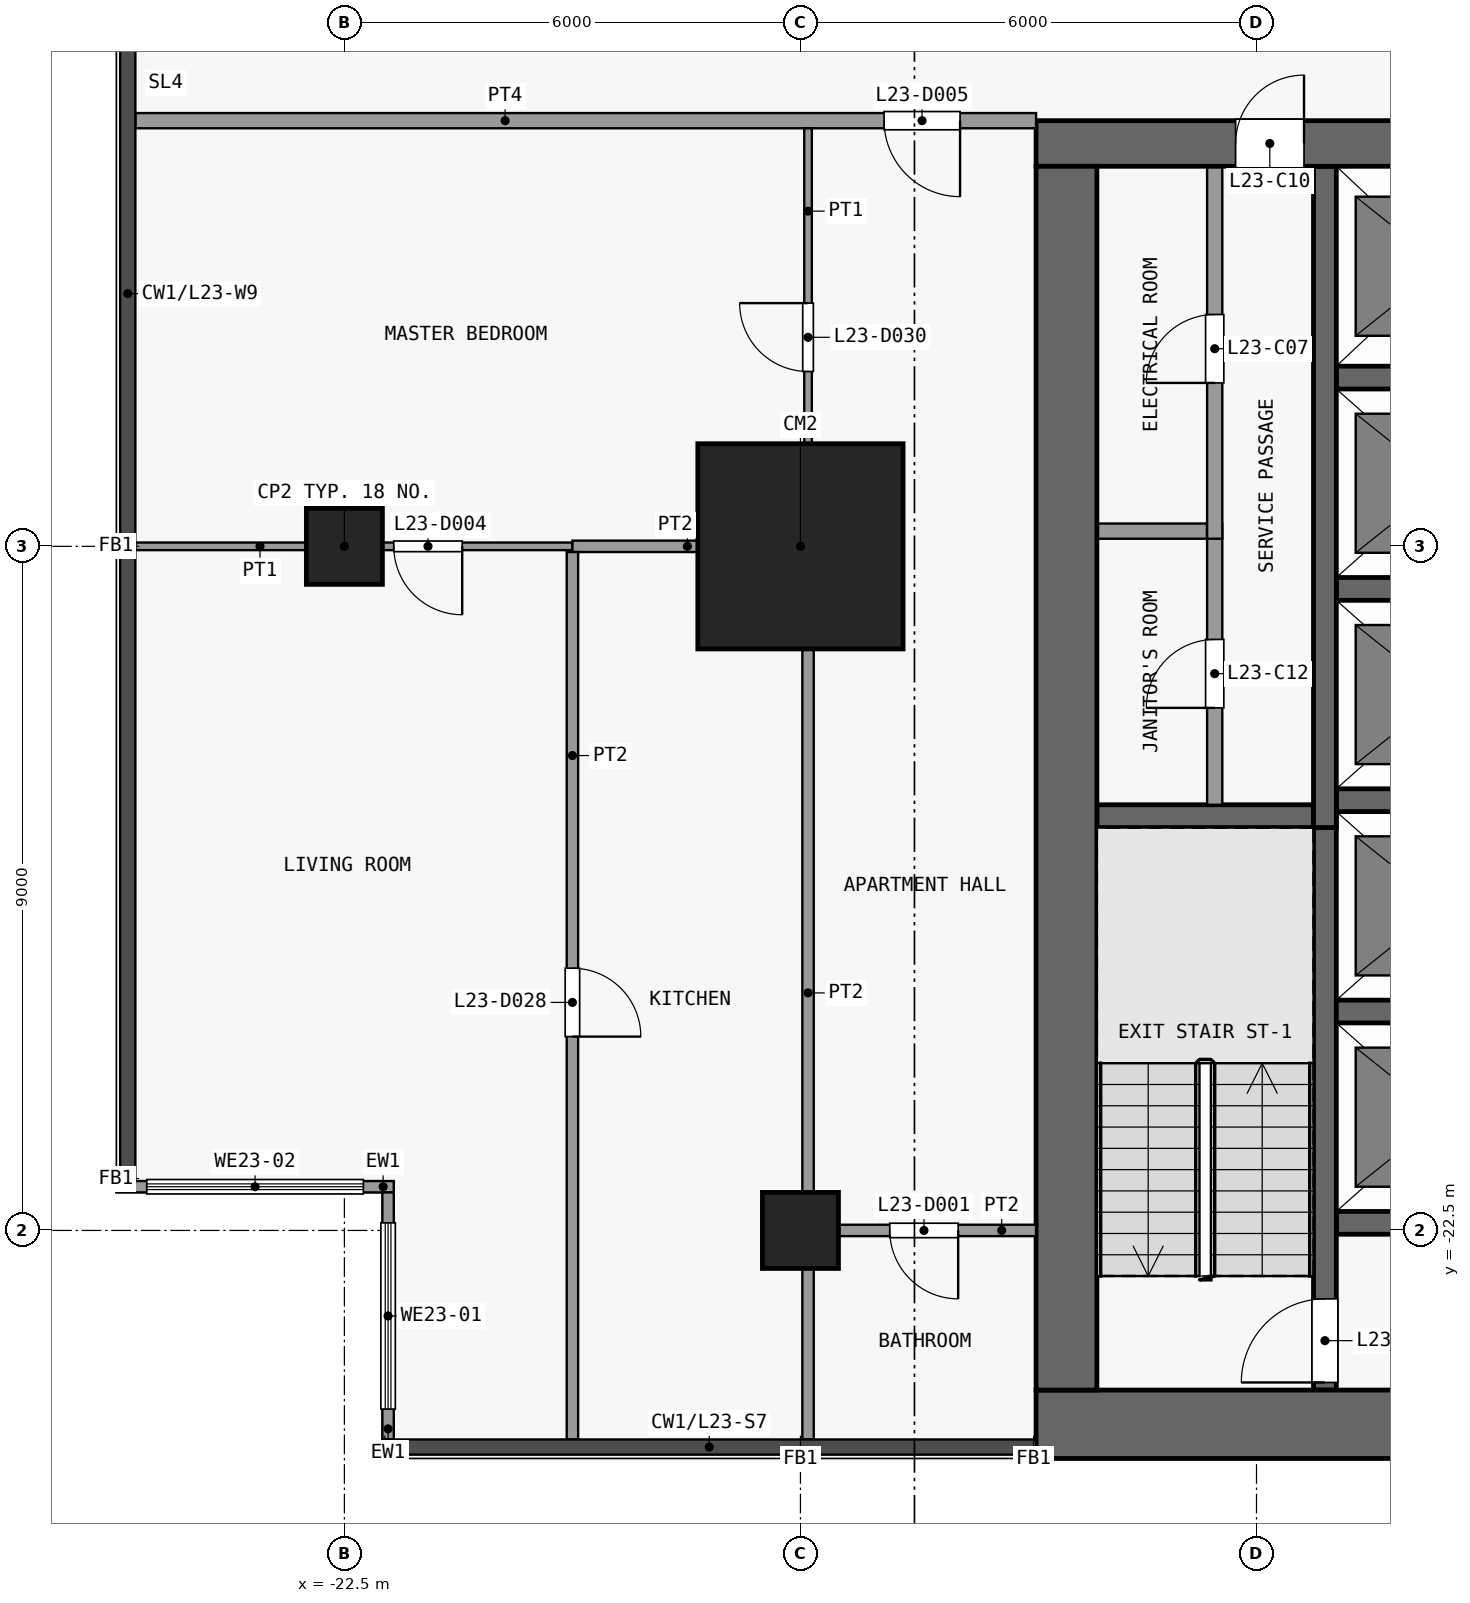
"""IFC4 building model, lengths in metres.
Left out: names, types, materials, properties, quantities, classifications, styles, units other than length and angle.
Written with IfcOpenShell. Run it as: python <this file> out.ifc"""

import sys

from ifc_helpers import new_model, si_unit, direction, frame, frame_2d, origin, origin_2d, place, context, subcontext, project, spatial, rectangle, extrude, element, fill, save


model = new_model("IFC4")
c1 = context("Model", 3, precision=1e-05, world=origin(), true_north=direction((0.0, 1.0)))
c2 = subcontext(c1, "Body", "Model", "MODEL_VIEW")
j1 = project(units=[si_unit("LENGTHUNIT", "METRE"), si_unit("PLANEANGLEUNIT", "RADIAN")], contexts=[c1])
p1 = place(None, origin())
s1 = spatial("IfcSite", under=j1, at=p1, CompositionType="ELEMENT")
p2 = place(p1, origin())
s2 = spatial("IfcBuilding", under=s1, at=p2, CompositionType="ELEMENT")
p3 = place(p2, frame((0.0, 0.0, 95.5)))
s3 = spatial("IfcBuildingStorey", under=s2, at=p3, CompositionType="ELEMENT", Elevation=95.5)
for number, where, z_axis, x_axis in (
    (1, (-22.5, -13.5, 0.0), (0.0, 0.0, 1.0), (1.0, 0.0, 0.0)),
    (2, (-16.5, -22.5, 0.0), (0.0, 0.0, 1.0), (1.0, 0.0, 0.0)),
):
    element("IfcColumn", number, at=place(p3, frame(where, z_axis=z_axis, x_axis=x_axis)), inside=s3, PredefinedType="COLUMN", context=c2, shape_type="SweptSolid", body=[
        extrude(rectangle(XDim=1.0, YDim=1.0, at=origin_2d()), origin(), (0.0, 0.0, 1.0), 3.6),
    ])
p4 = place(p3, frame((-16.5, -13.5, 0.0), z_axis=(0.0, 0.0, 1.0), x_axis=(1.0, 0.0, 0.0)))
e3 = element("IfcColumn", 3, at=p4, inside=s3, PredefinedType="COLUMN", context=c2, shape_type="SweptSolid", body=[
    extrude(rectangle(XDim=2.7, YDim=2.7, at=origin_2d()), origin(), (0.0, 0.0, 1.0), 3.6),
])
p5 = place(p3, frame((-13.4, -25.05, 0.0), z_axis=(0.0, 0.0, 1.0), x_axis=(1.0, 0.0, 0.0)))
e4 = element("IfcWall", 4, at=p5, inside=s3, PredefinedType="SHEAR", context=c2, shape_type="SweptSolid", body=[
    extrude(rectangle(XDim=26.8, YDim=0.9, at=frame_2d((13.4, 0.0))), origin(), (0.0, 0.0, 1.0), 3.3),
])
p6 = place(p3, frame((-13.4, -8.2, 0.0), z_axis=(0.0, 0.0, 1.0), x_axis=(1.0, 0.0, 0.0)))
e5 = element("IfcWall", 5, at=p6, inside=s3, PredefinedType="SHEAR", context=c2, shape_type="SweptSolid", body=[
    extrude(rectangle(XDim=26.8, YDim=0.6, at=frame_2d((13.4, 0.0))), origin(), (0.0, 0.0, 1.0), 3.3),
])
p7 = place(p6, frame((7.7, 0.0, 0.0)))
e6 = element("IfcOpeningElement", 6, at=p7, cuts=e5, PredefinedType="OPENING", context=c2, shape_type="SweptSolid", body=[
    extrude(rectangle(XDim=1.8, YDim=2.1, at=frame_2d((0.9, 1.05))), frame((0.0, 0.31, 0.0), z_axis=(0.0, -1.0, 0.0), x_axis=(1.0, 0.0, 0.0)), (0.0, 0.0, 1.0), 0.62),
])
p8 = place(p6, frame((17.3, 0.0, 0.0)))
e7 = element("IfcOpeningElement", 7, at=p8, cuts=e5, PredefinedType="OPENING", context=c2, shape_type="SweptSolid", body=[
    extrude(rectangle(XDim=1.8, YDim=2.1, at=frame_2d((0.9, 1.05))), frame((0.0, 0.31, 0.0), z_axis=(0.0, -1.0, 0.0), x_axis=(1.0, 0.0, 0.0)), (0.0, 0.0, 1.0), 0.62),
])
p9 = place(p6, frame((2.625, 0.0, 0.0)))
e8 = element("IfcOpeningElement", 8, at=p9, cuts=e5, PredefinedType="OPENING", context=c2, shape_type="SweptSolid", body=[
    extrude(rectangle(XDim=0.9, YDim=2.1, at=frame_2d((0.45, 1.05))), frame((0.0, 0.31, 0.0), z_axis=(0.0, -1.0, 0.0), x_axis=(1.0, 0.0, 0.0)), (0.0, 0.0, 1.0), 0.62),
])
p10 = place(p6, frame((23.275, 0.0, 0.0)))
e9 = element("IfcOpeningElement", 9, at=p10, cuts=e5, PredefinedType="OPENING", context=c2, shape_type="SweptSolid", body=[
    extrude(rectangle(XDim=0.9, YDim=2.1, at=frame_2d((0.45, 1.05))), frame((0.0, 0.31, 0.0), z_axis=(0.0, -1.0, 0.0), x_axis=(1.0, 0.0, 0.0)), (0.0, 0.0, 1.0), 0.62),
])
p11 = place(p3, frame((-13.0, -24.6, 0.0), z_axis=(0.0, 0.0, 1.0), x_axis=(0.0, 1.0, 0.0)))
e10 = element("IfcWall", 10, at=p11, inside=s3, PredefinedType="SHEAR", context=c2, shape_type="SweptSolid", body=[
    extrude(rectangle(XDim=16.1, YDim=0.8, at=frame_2d((8.05, 0.0))), origin(), (0.0, 0.0, 1.0), 3.3),
])
for number, where, z_axis, x_axis in (
    (11, (-9.45, -22.4, 0.0), (0.0, 0.0, 1.0), (1.0, 0.0, 0.0)),
    (12, (-9.45, -19.62, 0.0), (0.0, 0.0, 1.0), (1.0, 0.0, 0.0)),
):
    element("IfcWall", number, at=place(p3, frame(where, z_axis=z_axis, x_axis=x_axis)), inside=s3, PredefinedType="SHEAR", context=c2, shape_type="SweptSolid", body=[
        extrude(rectangle(XDim=2.8, YDim=0.3, at=frame_2d((1.4, 0.0))), origin(), (0.0, 0.0, 1.0), 3.3),
    ])
p12 = place(p3, frame((-12.6, -17.05, 0.0), z_axis=(0.0, 0.0, 1.0), x_axis=(1.0, 0.0, 0.0)))
e13 = element("IfcWall", 13, at=p12, inside=s3, PredefinedType="SHEAR", context=c2, shape_type="SweptSolid", body=[
    extrude(rectangle(XDim=2.85, YDim=0.3, at=frame_2d((1.425, 0.0))), origin(), (0.0, 0.0, 1.0), 3.3),
])
for number, where, z_axis, x_axis in (
    (14, (-9.45, -16.84, 0.0), (0.0, 0.0, 1.0), (1.0, 0.0, 0.0)),
    (15, (-9.45, -14.06, 0.0), (0.0, 0.0, 1.0), (1.0, 0.0, 0.0)),
):
    element("IfcWall", number, at=place(p3, frame(where, z_axis=z_axis, x_axis=x_axis)), inside=s3, PredefinedType="SHEAR", context=c2, shape_type="SweptSolid", body=[
        extrude(rectangle(XDim=2.8, YDim=0.3, at=frame_2d((1.4, 0.0))), origin(), (0.0, 0.0, 1.0), 3.3),
    ])
p13 = place(p3, frame((-12.6, -13.3, 0.0), z_axis=(0.0, 0.0, 1.0), x_axis=(1.0, 0.0, 0.0)))
e16 = element("IfcWall", 16, at=p13, inside=s3, PredefinedType="PARTITIONING", context=c2, shape_type="SweptSolid", body=[
    extrude(rectangle(XDim=1.45, YDim=0.2, at=frame_2d((0.725, 0.0))), origin(), (0.0, 0.0, 1.0), 3.3),
])
p14 = place(p3, frame((-9.45, -11.28, 0.0), z_axis=(0.0, 0.0, 1.0), x_axis=(1.0, 0.0, 0.0)))
e17 = element("IfcWall", 17, at=p14, inside=s3, PredefinedType="SHEAR", context=c2, shape_type="SweptSolid", body=[
    extrude(rectangle(XDim=2.8, YDim=0.3, at=frame_2d((1.4, 0.0))), origin(), (0.0, 0.0, 1.0), 3.3),
])
p15 = place(p3, frame((-11.05, -16.9, 0.0), z_axis=(0.0, 0.0, 1.0), x_axis=(0.0, 1.0, 0.0)))
e18 = element("IfcWall", 18, at=p15, inside=s3, PredefinedType="PARTITIONING", context=c2, shape_type="SweptSolid", body=[
    extrude(rectangle(XDim=3.7, YDim=0.2, at=frame_2d((1.85, 0.0))), origin(), (0.0, 0.0, 1.0), 3.3),
])
p16 = place(p15, frame((1.275, 0.0, 0.0)))
e19 = element("IfcOpeningElement", 19, at=p16, cuts=e18, PredefinedType="OPENING", context=c2, shape_type="SweptSolid", body=[
    extrude(rectangle(XDim=0.9, YDim=2.1, at=frame_2d((0.45, 1.05))), frame((0.0, 0.11, 0.0), z_axis=(0.0, -1.0, 0.0), x_axis=(1.0, 0.0, 0.0)), (0.0, 0.0, 1.0), 0.22),
])
p17 = place(p3, frame((-11.05, -13.4, 0.0), z_axis=(0.0, 0.0, 1.0), x_axis=(0.0, 1.0, 0.0)))
e20 = element("IfcWall", 20, at=p17, inside=s3, PredefinedType="PARTITIONING", context=c2, shape_type="SweptSolid", body=[
    extrude(rectangle(XDim=4.9, YDim=0.2, at=frame_2d((2.45, 0.0))), origin(), (0.0, 0.0, 1.0), 3.3),
])
p18 = place(p17, frame((2.05, 0.0, 0.0)))
e21 = element("IfcOpeningElement", 21, at=p18, cuts=e20, PredefinedType="OPENING", context=c2, shape_type="SweptSolid", body=[
    extrude(rectangle(XDim=0.9, YDim=2.1, at=frame_2d((0.45, 1.05))), frame((0.0, 0.11, 0.0), z_axis=(0.0, -1.0, 0.0), x_axis=(1.0, 0.0, 0.0)), (0.0, 0.0, 1.0), 0.22),
])
p19 = place(p3, frame((-9.6, -24.6, 0.0), z_axis=(0.0, 0.0, 1.0), x_axis=(0.0, 1.0, 0.0)))
e22 = element("IfcWall", 22, at=p19, inside=s3, PredefinedType="SHEAR", context=c2, shape_type="SweptSolid", body=[
    extrude(rectangle(XDim=7.7, YDim=0.3, at=frame_2d((3.85, 0.0))), origin(), (0.0, 0.0, 1.0), 3.3),
])
p20 = place(p19, frame((0.1, 0.0, 0.0)))
e23 = element("IfcOpeningElement", 23, at=p20, cuts=e22, PredefinedType="OPENING", context=c2, shape_type="SweptSolid", body=[
    extrude(rectangle(XDim=1.1, YDim=2.1, at=frame_2d((0.55, 1.05))), frame((0.0, 0.16, 0.0), z_axis=(0.0, -1.0, 0.0), x_axis=(1.0, 0.0, 0.0)), (0.0, 0.0, 1.0), 0.32),
])
p21 = place(p3, frame((-9.6, -17.2, 0.0), z_axis=(0.0, 0.0, 1.0), x_axis=(0.0, 1.0, 0.0)))
e24 = element("IfcWall", 24, at=p21, inside=s3, PredefinedType="SHEAR", context=c2, shape_type="SweptSolid", body=[
    extrude(rectangle(XDim=8.7, YDim=0.3, at=frame_2d((4.35, 0.0))), origin(), (0.0, 0.0, 1.0), 3.3),
])
p22 = place(p3, frame((-21.925, -25.25, 0.0), z_axis=(0.0, 0.0, 1.0), x_axis=(0.0, 1.0, 0.0)))
e25 = element("IfcWall", 25, at=p22, inside=s3, PredefinedType="SOLIDWALL", context=c2, shape_type="SweptSolid", body=[
    extrude(rectangle(XDim=3.25, YDim=0.15, at=frame_2d((1.625, 0.0))), origin(), (0.0, 0.0, 1.0), 3.3),
])
p23 = place(p22, frame((0.4, 0.0, 0.9)))
e26 = element("IfcOpeningElement", 26, at=p23, cuts=e25, PredefinedType="OPENING", context=c2, shape_type="SweptSolid", body=[
    extrude(rectangle(XDim=2.45, YDim=2.4, at=frame_2d((1.225, 1.2))), frame((0.0, 0.085, 0.0), z_axis=(0.0, -1.0, 0.0), x_axis=(1.0, 0.0, 0.0)), (0.0, 0.0, 1.0), 0.17),
])
p24 = place(p3, frame((-21.85, -21.925, 0.0), z_axis=(0.0, 0.0, 1.0), x_axis=(-1.0, 0.0, 0.0)))
e27 = element("IfcWall", 27, at=p24, inside=s3, PredefinedType="SOLIDWALL", context=c2, shape_type="SweptSolid", body=[
    extrude(rectangle(XDim=3.65, YDim=0.15, at=frame_2d((1.825, 0.0))), origin(), (0.0, 0.0, 1.0), 3.3),
])
p25 = place(p24, frame((0.4, 0.0, 0.9)))
e28 = element("IfcOpeningElement", 28, at=p25, cuts=e27, PredefinedType="OPENING", context=c2, shape_type="SweptSolid", body=[
    extrude(rectangle(XDim=2.85, YDim=2.4, at=frame_2d((1.425, 1.2))), frame((0.0, 0.085, 0.0), z_axis=(0.0, -1.0, 0.0), x_axis=(1.0, 0.0, 0.0)), (0.0, 0.0, 1.0), 0.17),
])
p26 = place(p3, frame((-16.325, -22.5, 0.0), z_axis=(0.0, 0.0, 1.0), x_axis=(1.0, 0.0, 0.0)))
e29 = element("IfcWall", 29, at=p26, inside=s3, PredefinedType="PARTITIONING", context=c2, shape_type="SweptSolid", body=[
    extrude(rectangle(XDim=2.925, YDim=0.15, at=frame_2d((1.462, 0.0))), origin(), (0.0, 0.0, 1.0), 3.3),
])
p27 = place(p26, frame((1.0, 0.0, 0.0)))
e30 = element("IfcOpeningElement", 30, at=p27, cuts=e29, PredefinedType="OPENING", context=c2, shape_type="SweptSolid", body=[
    extrude(rectangle(XDim=0.9, YDim=2.1, at=frame_2d((0.45, 1.05))), frame((0.0, 0.085, 0.0), z_axis=(0.0, -1.0, 0.0), x_axis=(1.0, 0.0, 0.0)), (0.0, 0.0, 1.0), 0.17),
])
p28 = place(p3, frame((-25.25, -13.5, 0.0), z_axis=(0.0, 0.0, 1.0), x_axis=(1.0, 0.0, 0.0)))
e31 = element("IfcWall", 31, at=p28, inside=s3, PredefinedType="PARTITIONING", context=c2, shape_type="SweptSolid", body=[
    extrude(rectangle(XDim=5.75, YDim=0.1, at=frame_2d((2.875, 0.0))), origin(), (0.0, 0.0, 1.0), 3.3),
])
p29 = place(p28, frame((3.4, 0.0, 0.0)))
e32 = element("IfcOpeningElement", 32, at=p29, cuts=e31, PredefinedType="OPENING", context=c2, shape_type="SweptSolid", body=[
    extrude(rectangle(XDim=0.9, YDim=2.1, at=frame_2d((0.45, 1.05))), frame((0.0, 0.06, 0.0), z_axis=(0.0, -1.0, 0.0), x_axis=(1.0, 0.0, 0.0)), (0.0, 0.0, 1.0), 0.12),
])
p30 = place(p3, frame((-19.5, -13.5, 0.0), z_axis=(0.0, 0.0, 1.0), x_axis=(1.0, 0.0, 0.0)))
e33 = element("IfcWall", 33, at=p30, inside=s3, PredefinedType="PARTITIONING", context=c2, shape_type="SweptSolid", body=[
    extrude(rectangle(XDim=3.025, YDim=0.15, at=frame_2d((1.512, 0.0))), origin(), (0.0, 0.0, 1.0), 3.3),
])
p31 = place(p3, frame((-25.25, -7.9, 0.0), z_axis=(0.0, 0.0, 1.0), x_axis=(1.0, 0.0, 0.0)))
e34 = element("IfcWall", 34, at=p31, inside=s3, PredefinedType="PARTITIONING", context=c2, shape_type="SweptSolid", body=[
    extrude(rectangle(XDim=11.85, YDim=0.2, at=frame_2d((5.925, 0.0))), origin(), (0.0, 0.0, 1.0), 3.3),
])
p32 = place(p31, frame((9.85, 0.0, 0.0)))
e35 = element("IfcOpeningElement", 35, at=p32, cuts=e34, PredefinedType="OPENING", context=c2, shape_type="SweptSolid", body=[
    extrude(rectangle(XDim=1.0, YDim=2.1, at=frame_2d((0.5, 1.05))), frame((0.0, 0.11, 0.0), z_axis=(0.0, -1.0, 0.0), x_axis=(1.0, 0.0, 0.0)), (0.0, 0.0, 1.0), 0.22),
])
p33 = place(p3, frame((-19.5, -25.25, 0.0), z_axis=(0.0, 0.0, 1.0), x_axis=(0.0, 1.0, 0.0)))
e36 = element("IfcWall", 36, at=p33, inside=s3, PredefinedType="PARTITIONING", context=c2, shape_type="SweptSolid", body=[
    extrude(rectangle(XDim=11.675, YDim=0.15, at=frame_2d((5.837, 0.0))), origin(), (0.0, 0.0, 1.0), 3.3),
])
p34 = place(p33, frame((5.3, 0.0, 0.0)))
e37 = element("IfcOpeningElement", 37, at=p34, cuts=e36, PredefinedType="OPENING", context=c2, shape_type="SweptSolid", body=[
    extrude(rectangle(XDim=0.9, YDim=2.1, at=frame_2d((0.45, 1.05))), frame((0.0, 0.085, 0.0), z_axis=(0.0, -1.0, 0.0), x_axis=(1.0, 0.0, 0.0)), (0.0, 0.0, 1.0), 0.17),
])
p35 = place(p3, frame((-16.4, -13.5, 0.0), z_axis=(0.0, 0.0, 1.0), x_axis=(0.0, 1.0, 0.0)))
e38 = element("IfcWall", 38, at=p35, inside=s3, PredefinedType="PARTITIONING", context=c2, shape_type="SweptSolid", body=[
    extrude(rectangle(XDim=5.5, YDim=0.1, at=frame_2d((2.75, 0.0))), origin(), (0.0, 0.0, 1.0), 3.3),
])
p36 = place(p35, frame((2.3, 0.0, 0.0)))
e39 = element("IfcOpeningElement", 39, at=p36, cuts=e38, PredefinedType="OPENING", context=c2, shape_type="SweptSolid", body=[
    extrude(rectangle(XDim=0.9, YDim=2.1, at=frame_2d((0.45, 1.05))), frame((0.0, 0.06, 0.0), z_axis=(0.0, -1.0, 0.0), x_axis=(1.0, 0.0, 0.0)), (0.0, 0.0, 1.0), 0.12),
])
p37 = place(p3, frame((-16.4, -25.25, 0.0), z_axis=(0.0, 0.0, 1.0), x_axis=(0.0, 1.0, 0.0)))
e40 = element("IfcWall", 40, at=p37, inside=s3, PredefinedType="PARTITIONING", context=c2, shape_type="SweptSolid", body=[
    extrude(rectangle(XDim=11.75, YDim=0.15, at=frame_2d((5.875, 0.0))), origin(), (0.0, 0.0, 1.0), 3.3),
])
p38 = place(p18, origin())
e41 = element("IfcDoor", 41, at=p38, inside=s3, OperationType="SINGLE_SWING_LEFT", PredefinedType="DOOR", context=c2, shape_type="SweptSolid", body=[
    extrude(rectangle(XDim=0.9, YDim=2.1, at=frame_2d((0.45, 1.05))), frame((0.0, 0.025, 0.0), z_axis=(0.0, -1.0, 0.0), x_axis=(1.0, 0.0, 0.0)), (0.0, 0.0, 1.0), 0.05),
])
fill(e21, e41)
p39 = place(p9, origin())
e42 = element("IfcDoor", 42, at=p39, inside=s3, OperationType="SINGLE_SWING_RIGHT", PredefinedType="DOOR", context=c2, shape_type="SweptSolid", body=[
    extrude(rectangle(XDim=0.9, YDim=2.1, at=frame_2d((0.45, 1.05))), frame((0.0, 0.025, 0.0), z_axis=(0.0, -1.0, 0.0), x_axis=(1.0, 0.0, 0.0)), (0.0, 0.0, 1.0), 0.05),
])
fill(e8, e42)
p40 = place(p16, origin())
e43 = element("IfcDoor", 43, at=p40, inside=s3, OperationType="SINGLE_SWING_LEFT", PredefinedType="DOOR", context=c2, shape_type="SweptSolid", body=[
    extrude(rectangle(XDim=0.9, YDim=2.1, at=frame_2d((0.45, 1.05))), frame((0.0, 0.025, 0.0), z_axis=(0.0, -1.0, 0.0), x_axis=(1.0, 0.0, 0.0)), (0.0, 0.0, 1.0), 0.05),
])
fill(e19, e43)
p41 = place(p20, origin())
e44 = element("IfcDoor", 44, at=p41, inside=s3, OperationType="SINGLE_SWING_LEFT", PredefinedType="DOOR", context=c2, shape_type="SweptSolid", body=[
    extrude(rectangle(XDim=1.1, YDim=2.1, at=frame_2d((0.55, 1.05))), frame((0.0, 0.025, 0.0), z_axis=(0.0, -1.0, 0.0), x_axis=(1.0, 0.0, 0.0)), (0.0, 0.0, 1.0), 0.05),
])
fill(e23, e44)
p42 = place(p23, origin())
e45 = element("IfcWindow", 45, at=p42, inside=s3, PartitioningType="SINGLE_PANEL", PredefinedType="WINDOW", context=c2, shape_type="SweptSolid", body=[
    extrude(rectangle(XDim=2.45, YDim=2.4, at=frame_2d((1.225, 1.2))), frame((0.0, 0.03, 0.0), z_axis=(0.0, -1.0, 0.0), x_axis=(1.0, 0.0, 0.0)), (0.0, 0.0, 1.0), 0.06),
])
fill(e26, e45)
p43 = place(p25, origin())
e46 = element("IfcWindow", 46, at=p43, inside=s3, PartitioningType="SINGLE_PANEL", PredefinedType="WINDOW", context=c2, shape_type="SweptSolid", body=[
    extrude(rectangle(XDim=2.85, YDim=2.4, at=frame_2d((1.425, 1.2))), frame((0.0, 0.03, 0.0), z_axis=(0.0, -1.0, 0.0), x_axis=(1.0, 0.0, 0.0)), (0.0, 0.0, 1.0), 0.06),
])
fill(e28, e46)
p44 = place(p27, origin())
e47 = element("IfcDoor", 47, at=p44, inside=s3, OperationType="SINGLE_SWING_RIGHT", PredefinedType="DOOR", context=c2, shape_type="SweptSolid", body=[
    extrude(rectangle(XDim=0.9, YDim=2.1, at=frame_2d((0.45, 1.05))), frame((0.0, 0.025, 0.0), z_axis=(0.0, -1.0, 0.0), x_axis=(1.0, 0.0, 0.0)), (0.0, 0.0, 1.0), 0.05),
])
fill(e30, e47)
p45 = place(p29, origin())
e48 = element("IfcDoor", 48, at=p45, inside=s3, OperationType="SINGLE_SWING_RIGHT", PredefinedType="DOOR", context=c2, shape_type="SweptSolid", body=[
    extrude(rectangle(XDim=0.9, YDim=2.1, at=frame_2d((0.45, 1.05))), frame((0.0, 0.025, 0.0), z_axis=(0.0, -1.0, 0.0), x_axis=(1.0, 0.0, 0.0)), (0.0, 0.0, 1.0), 0.05),
])
fill(e32, e48)
p46 = place(p32, origin())
e49 = element("IfcDoor", 49, at=p46, inside=s3, OperationType="SINGLE_SWING_RIGHT", PredefinedType="DOOR", context=c2, shape_type="SweptSolid", body=[
    extrude(rectangle(XDim=1.0, YDim=2.1, at=frame_2d((0.5, 1.05))), frame((0.0, 0.025, 0.0), z_axis=(0.0, -1.0, 0.0), x_axis=(1.0, 0.0, 0.0)), (0.0, 0.0, 1.0), 0.05),
])
fill(e35, e49)
p47 = place(p34, origin())
e50 = element("IfcDoor", 50, at=p47, inside=s3, OperationType="SINGLE_SWING_LEFT", PredefinedType="DOOR", context=c2, shape_type="SweptSolid", body=[
    extrude(rectangle(XDim=0.9, YDim=2.1, at=frame_2d((0.45, 1.05))), frame((0.0, 0.025, 0.0), z_axis=(0.0, -1.0, 0.0), x_axis=(1.0, 0.0, 0.0)), (0.0, 0.0, 1.0), 0.05),
])
fill(e37, e50)
p48 = place(p36, origin())
e51 = element("IfcDoor", 51, at=p48, inside=s3, OperationType="SINGLE_SWING_LEFT", PredefinedType="DOOR", context=c2, shape_type="SweptSolid", body=[
    extrude(rectangle(XDim=0.9, YDim=2.1, at=frame_2d((0.45, 1.05))), frame((0.0, 0.025, 0.0), z_axis=(0.0, -1.0, 0.0), x_axis=(1.0, 0.0, 0.0)), (0.0, 0.0, 1.0), 0.05),
])
fill(e39, e51)
save(model, sys.argv[1])
